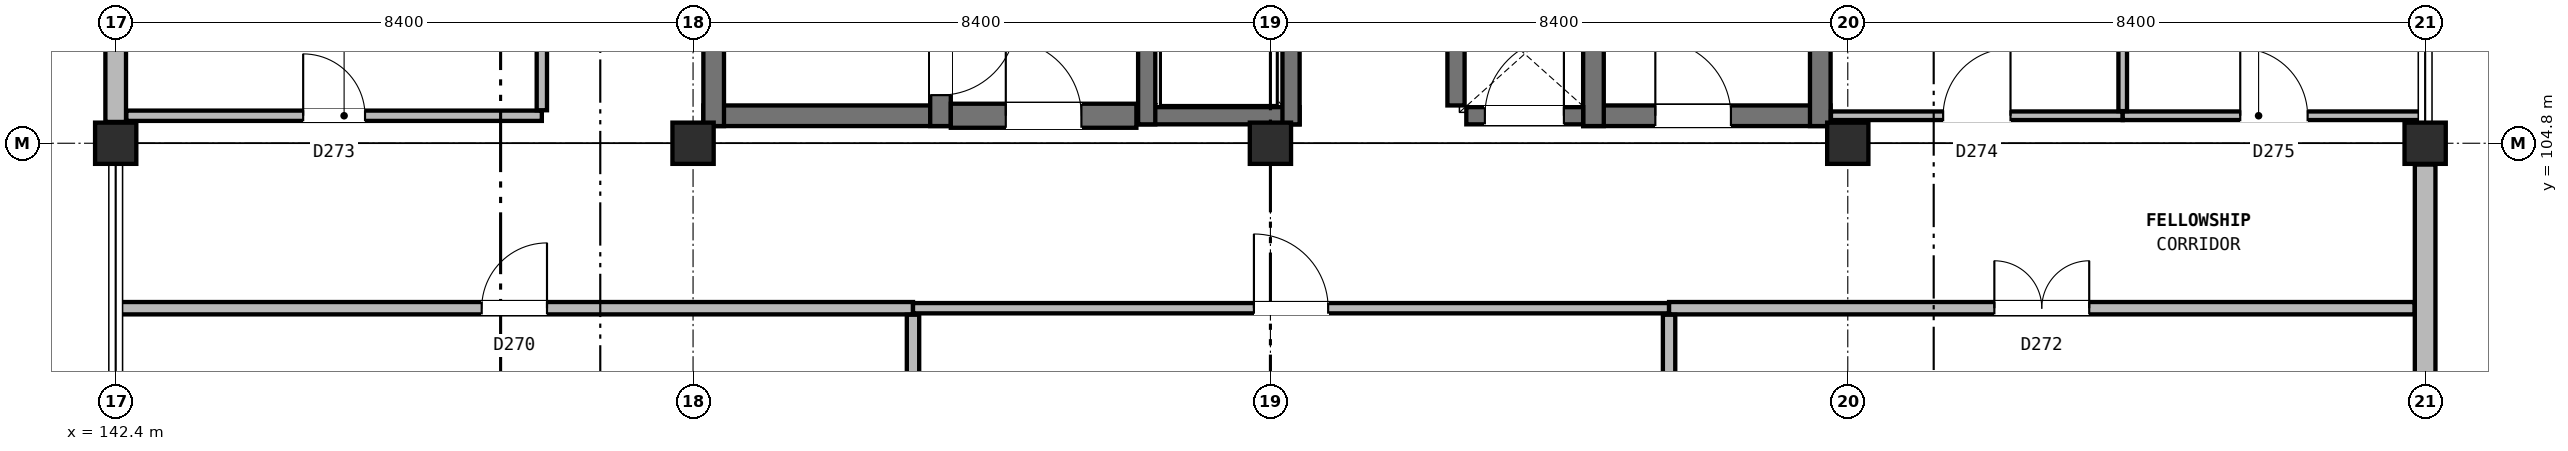
"""IFC4 building model, lengths in metres.
Left out: names, types, materials, properties, quantities, classifications, styles, units other than length and angle.
Written with IfcOpenShell. Run it as: python <this file> out.ifc"""

import sys

from ifc_helpers import new_model, si_unit, direction, frame, frame_2d, origin, origin_2d, place, context, subcontext, project, spatial, rectangle, extrude, element, fill, save


model = new_model("IFC4")
c1 = context("Model", 3, precision=1e-05, world=origin(), true_north=direction((0.0, 1.0)))
c2 = subcontext(c1, "Body", "Model", "MODEL_VIEW")
j1 = project(units=[si_unit("LENGTHUNIT", "METRE"), si_unit("PLANEANGLEUNIT", "RADIAN")], contexts=[c1])
p1 = place(None, origin())
s1 = spatial("IfcSite", under=j1, at=p1, CompositionType="ELEMENT")
p2 = place(p1, origin())
s2 = spatial("IfcBuilding", under=s1, at=p2, CompositionType="ELEMENT")
p3 = place(p2, frame((0.0, 0.0, 56.0)))
s3 = spatial("IfcBuildingStorey", under=s2, at=p3, CompositionType="ELEMENT", Elevation=56.0)
for number, where, z_axis, x_axis in (
    (1, (142.4, 104.8, 0.0), (0.0, 0.0, 1.0), (1.0, 0.0, 0.0)),
    (2, (150.8, 104.8, 0.0), (0.0, 0.0, 1.0), (1.0, 0.0, 0.0)),
    (3, (159.2, 104.8, 0.0), (0.0, 0.0, 1.0), (1.0, 0.0, 0.0)),
    (4, (167.6, 104.8, 0.0), (0.0, 0.0, 1.0), (1.0, 0.0, 0.0)),
    (5, (176.0, 104.8, 0.0), (0.0, 0.0, 1.0), (1.0, 0.0, 0.0)),
):
    element("IfcColumn", number, at=place(p3, frame(where, z_axis=z_axis, x_axis=x_axis)), inside=s3, PredefinedType="COLUMN", context=c2, shape_type="SweptSolid", body=[
        extrude(rectangle(XDim=0.6, YDim=0.6, at=origin_2d()), origin(), (0.0, 0.0, 1.0), 3.8),
    ])
p4 = place(p3, frame((176.0, 96.31, 0.0), z_axis=(0.0, 0.0, 1.0), x_axis=(0.0, 1.0, 0.0)))
e6 = element("IfcWall", 6, at=p4, inside=s3, PredefinedType="SOLIDWALL", context=c2, shape_type="SweptSolid", body=[
    extrude(rectangle(XDim=8.18, YDim=0.3, at=frame_2d((4.09, 0.0))), origin(), (0.0, 0.0, 1.0), 3.05),
])
p5 = place(p4, frame((1.745, 0.0, 0.9)))
e7 = element("IfcOpeningElement", 7, at=p5, cuts=e6, PredefinedType="OPENING", context=c2, shape_type="SweptSolid", body=[
    extrude(rectangle(XDim=2.6, YDim=2.0, at=frame_2d((1.3, 1.0))), frame((0.0, 0.16, 0.0), z_axis=(0.0, -1.0, 0.0), x_axis=(1.0, 0.0, 0.0)), (0.0, 0.0, 1.0), 0.32),
])
p6 = place(p3, frame((142.4, 113.29, 0.0), z_axis=(0.0, 0.0, 1.0), x_axis=(0.0, -1.0, 0.0)))
e8 = element("IfcWall", 8, at=p6, inside=s3, PredefinedType="SOLIDWALL", context=c2, shape_type="SweptSolid", body=[
    extrude(rectangle(XDim=8.18, YDim=0.3, at=frame_2d((4.09, 0.0))), origin(), (0.0, 0.0, 1.0), 3.05),
])
p7 = place(p6, frame((2.745, 0.0, 0.9)))
e9 = element("IfcOpeningElement", 9, at=p7, cuts=e8, PredefinedType="OPENING", context=c2, shape_type="SweptSolid", body=[
    extrude(rectangle(XDim=2.6, YDim=2.0, at=frame_2d((1.3, 1.0))), frame((0.0, 0.16, 0.0), z_axis=(0.0, -1.0, 0.0), x_axis=(1.0, 0.0, 0.0)), (0.0, 0.0, 1.0), 0.32),
])
p8 = place(p3, frame((150.95, 105.2, 0.0), z_axis=(0.0, 0.0, 1.0), x_axis=(1.0, 0.0, 0.0)))
e10 = element("IfcWall", 10, at=p8, inside=s3, PredefinedType="SHEAR", context=c2, shape_type="SweptSolid", body=[
    extrude(rectangle(XDim=3.6, YDim=0.3, at=frame_2d((1.8, 0.0))), origin(), (0.0, 0.0, 1.0), 3.8),
])
p9 = place(p3, frame((151.1, 105.05, 0.0), z_axis=(0.0, 0.0, 1.0), x_axis=(0.0, 1.0, 0.0)))
e11 = element("IfcWall", 11, at=p9, inside=s3, PredefinedType="SHEAR", context=c2, shape_type="SweptSolid", body=[
    extrude(rectangle(XDim=8.3, YDim=0.3, at=frame_2d((4.15, 0.0))), origin(), (0.0, 0.0, 1.0), 3.8),
])
p10 = place(p3, frame((154.4, 105.05, 0.0), z_axis=(0.0, 0.0, 1.0), x_axis=(0.0, 1.0, 0.0)))
e12 = element("IfcWall", 12, at=p10, inside=s3, PredefinedType="SHEAR", context=c2, shape_type="SweptSolid", body=[
    extrude(rectangle(XDim=8.3, YDim=0.3, at=frame_2d((4.15, 0.0))), origin(), (0.0, 0.0, 1.0), 3.8),
])
p11 = place(p10, frame((0.45, 0.0, 0.0)))
e13 = element("IfcOpeningElement", 13, at=p11, cuts=e12, PredefinedType="OPENING", context=c2, shape_type="SweptSolid", body=[
    extrude(rectangle(XDim=1.1, YDim=2.2, at=frame_2d((0.55, 1.1))), frame((0.0, 0.16, 0.0), z_axis=(0.0, -1.0, 0.0), x_axis=(1.0, 0.0, 0.0)), (0.0, 0.0, 1.0), 0.32),
])
p12 = place(p3, frame((163.75, 105.2, 0.0), z_axis=(0.0, 0.0, 1.0), x_axis=(1.0, 0.0, 0.0)))
e14 = element("IfcWall", 14, at=p12, inside=s3, PredefinedType="SHEAR", context=c2, shape_type="SweptSolid", body=[
    extrude(rectangle(XDim=3.6, YDim=0.3, at=frame_2d((1.8, 0.0))), origin(), (0.0, 0.0, 1.0), 3.8),
])
p13 = place(p12, frame((1.05, 0.0, 0.0)))
e15 = element("IfcOpeningElement", 15, at=p13, cuts=e14, PredefinedType="OPENING", context=c2, shape_type="SweptSolid", body=[
    extrude(rectangle(XDim=1.1, YDim=2.2, at=frame_2d((0.55, 1.1))), frame((0.0, 0.16, 0.0), z_axis=(0.0, -1.0, 0.0), x_axis=(1.0, 0.0, 0.0)), (0.0, 0.0, 1.0), 0.32),
])
for number, where, z_axis, x_axis in (
    (16, (163.9, 105.05, 0.0), (0.0, 0.0, 1.0), (0.0, 1.0, 0.0)),
    (17, (167.2, 105.05, 0.0), (0.0, 0.0, 1.0), (0.0, 1.0, 0.0)),
):
    element("IfcWall", number, at=place(p3, frame(where, z_axis=z_axis, x_axis=x_axis)), inside=s3, PredefinedType="SHEAR", context=c2, shape_type="SweptSolid", body=[
        extrude(rectangle(XDim=8.3, YDim=0.3, at=frame_2d((4.15, 0.0))), origin(), (0.0, 0.0, 1.0), 3.8),
    ])
p14 = place(p3, frame((157.275, 105.2, 0.0), z_axis=(0.0, 0.0, 1.0), x_axis=(1.0, 0.0, 0.0)))
e18 = element("IfcWall", 18, at=p14, inside=s3, PredefinedType="SOLIDWALL", context=c2, shape_type="SweptSolid", body=[
    extrude(rectangle(XDim=2.35, YDim=0.25, at=frame_2d((1.175, 0.0))), origin(), (0.0, 0.0, 1.0), 3.48),
])
for number, where, z_axis, x_axis in (
    (19, (157.4, 105.075, 0.0), (0.0, 0.0, 1.0), (0.0, 1.0, 0.0)),
    (20, (159.5, 105.075, 0.0), (0.0, 0.0, 1.0), (0.0, 1.0, 0.0)),
):
    element("IfcWall", number, at=place(p3, frame(where, z_axis=z_axis, x_axis=x_axis)), inside=s3, PredefinedType="SOLIDWALL", context=c2, shape_type="SweptSolid", body=[
        extrude(rectangle(XDim=2.65, YDim=0.25, at=frame_2d((1.325, 0.0))), origin(), (0.0, 0.0, 1.0), 3.48),
    ])
p15 = place(p3, frame((154.55, 105.2, 0.0), z_axis=(0.0, 0.0, 1.0), x_axis=(1.0, 0.0, 0.0)))
e21 = element("IfcWall", 21, at=p15, inside=s3, PredefinedType="SHEAR", context=c2, shape_type="SweptSolid", body=[
    extrude(rectangle(XDim=2.7, YDim=0.35, at=frame_2d((1.35, 0.0))), origin(), (0.0, 0.0, 1.0), 3.48),
])
p16 = place(p15, frame((0.8, 0.0, 0.0)))
e22 = element("IfcOpeningElement", 22, at=p16, cuts=e21, PredefinedType="OPENING", context=c2, shape_type="SweptSolid", body=[
    extrude(rectangle(XDim=1.1, YDim=2.2, at=frame_2d((0.55, 1.1))), frame((0.0, 0.185, 0.0), z_axis=(0.0, -1.0, 0.0), x_axis=(1.0, 0.0, 0.0)), (0.0, 0.0, 1.0), 0.37),
])
p17 = place(p3, frame((161.9, 105.35, 0.0), z_axis=(0.0, 0.0, 1.0), x_axis=(0.0, 1.0, 0.0)))
e23 = element("IfcWall", 23, at=p17, inside=s3, PredefinedType="SOLIDWALL", context=c2, shape_type="SweptSolid", body=[
    extrude(rectangle(XDim=1.5, YDim=0.25, at=frame_2d((0.75, 0.0))), origin(), (0.0, 0.0, 1.0), 3.48),
])
p18 = place(p3, frame((162.05, 105.2, 0.0), z_axis=(0.0, 0.0, 1.0), x_axis=(1.0, 0.0, 0.0)))
e24 = element("IfcWall", 24, at=p18, inside=s3, PredefinedType="SOLIDWALL", context=c2, shape_type="SweptSolid", body=[
    extrude(rectangle(XDim=1.7, YDim=0.25, at=frame_2d((0.85, 0.0))), origin(), (0.0, 0.0, 1.0), 3.48),
])
p19 = place(p18, frame((0.27, 0.0, 0.0)))
e25 = element("IfcOpeningElement", 25, at=p19, cuts=e24, PredefinedType="OPENING", context=c2, shape_type="SweptSolid", body=[
    extrude(rectangle(XDim=1.15, YDim=2.2, at=frame_2d((0.575, 1.1))), frame((0.0, 0.135, 0.0), z_axis=(0.0, -1.0, 0.0), x_axis=(1.0, 0.0, 0.0)), (0.0, 0.0, 1.0), 0.27),
])
p20 = place(p3, frame((142.4, 102.4, 0.0), z_axis=(0.0, 0.0, 1.0), x_axis=(1.0, 0.0, 0.0)))
e26 = element("IfcWall", 26, at=p20, inside=s3, PredefinedType="PARTITIONING", context=c2, shape_type="SweptSolid", body=[
    extrude(rectangle(XDim=11.6, YDim=0.18, at=frame_2d((5.8, 0.0))), origin(), (0.0, 0.0, 1.0), 3.465),
])
p21 = place(p20, frame((5.325, 0.0, 0.0)))
e27 = element("IfcOpeningElement", 27, at=p21, cuts=e26, PredefinedType="OPENING", context=c2, shape_type="SweptSolid", body=[
    extrude(rectangle(XDim=0.95, YDim=2.18, at=frame_2d((0.475, 1.09))), frame((0.0, 0.1, 0.0), z_axis=(0.0, -1.0, 0.0), x_axis=(1.0, 0.0, 0.0)), (0.0, 0.0, 1.0), 0.2),
])
p22 = place(p3, frame((154.0, 102.4, 0.0), z_axis=(0.0, 0.0, 1.0), x_axis=(1.0, 0.0, 0.0)))
e28 = element("IfcWall", 28, at=p22, inside=s3, PredefinedType="PARTITIONING", context=c2, shape_type="SweptSolid", body=[
    extrude(rectangle(XDim=11.0, YDim=0.15, at=frame_2d((5.5, 0.0))), origin(), (0.0, 0.0, 1.0), 3.465),
])
p23 = place(p22, frame((4.96, 0.0, 0.0)))
e29 = element("IfcOpeningElement", 29, at=p23, cuts=e28, PredefinedType="OPENING", context=c2, shape_type="SweptSolid", body=[
    extrude(rectangle(XDim=1.08, YDim=2.22, at=frame_2d((0.54, 1.11))), frame((0.0, 0.085, 0.0), z_axis=(0.0, -1.0, 0.0), x_axis=(1.0, 0.0, 0.0)), (0.0, 0.0, 1.0), 0.17),
])
p24 = place(p3, frame((165.0, 102.4, 0.0), z_axis=(0.0, 0.0, 1.0), x_axis=(1.0, 0.0, 0.0)))
e30 = element("IfcWall", 30, at=p24, inside=s3, PredefinedType="PARTITIONING", context=c2, shape_type="SweptSolid", body=[
    extrude(rectangle(XDim=10.845, YDim=0.18, at=frame_2d((5.422, 0.0))), origin(), (0.0, 0.0, 1.0), 3.465),
])
p25 = place(p24, frame((4.732, 0.0, 0.0)))
e31 = element("IfcOpeningElement", 31, at=p25, cuts=e30, PredefinedType="OPENING", context=c2, shape_type="SweptSolid", body=[
    extrude(rectangle(XDim=1.38, YDim=2.2, at=frame_2d((0.69, 1.1))), frame((0.0, 0.1, 0.0), z_axis=(0.0, -1.0, 0.0), x_axis=(1.0, 0.0, 0.0)), (0.0, 0.0, 1.0), 0.2),
])
p26 = place(p3, frame((142.555, 105.2, 0.0), z_axis=(0.0, 0.0, 1.0), x_axis=(1.0, 0.0, 0.0)))
e32 = element("IfcWall", 32, at=p26, inside=s3, PredefinedType="PARTITIONING", context=c2, shape_type="SweptSolid", body=[
    extrude(rectangle(XDim=6.045, YDim=0.15, at=frame_2d((3.022, 0.0))), origin(), (0.0, 0.0, 1.0), 3.045),
])
p27 = place(p26, frame((2.573, 0.0, 0.0)))
e33 = element("IfcOpeningElement", 33, at=p27, cuts=e32, PredefinedType="OPENING", context=c2, shape_type="SweptSolid", body=[
    extrude(rectangle(XDim=0.9, YDim=2.12, at=frame_2d((0.45, 1.06))), frame((0.0, 0.085, 0.0), z_axis=(0.0, -1.0, 0.0), x_axis=(1.0, 0.0, 0.0)), (0.0, 0.0, 1.0), 0.17),
])
p28 = place(p3, frame((167.355, 105.2, 0.0), z_axis=(0.0, 0.0, 1.0), x_axis=(1.0, 0.0, 0.0)))
e34 = element("IfcWall", 34, at=p28, inside=s3, PredefinedType="PARTITIONING", context=c2, shape_type="SweptSolid", body=[
    extrude(rectangle(XDim=4.245, YDim=0.125, at=frame_2d((2.123, 0.0))), origin(), (0.0, 0.0, 1.0), 3.045),
])
p29 = place(p28, frame((1.633, 0.0, 0.0)))
e35 = element("IfcOpeningElement", 35, at=p29, cuts=e34, PredefinedType="OPENING", context=c2, shape_type="SweptSolid", body=[
    extrude(rectangle(XDim=0.98, YDim=2.1, at=frame_2d((0.49, 1.05))), frame((0.0, 0.073, 0.0), z_axis=(0.0, -1.0, 0.0), x_axis=(1.0, 0.0, 0.0)), (0.0, 0.0, 1.0), 0.145),
])
p30 = place(p3, frame((171.6, 105.2, 0.0), z_axis=(0.0, 0.0, 1.0), x_axis=(1.0, 0.0, 0.0)))
e36 = element("IfcWall", 36, at=p30, inside=s3, PredefinedType="PARTITIONING", context=c2, shape_type="SweptSolid", body=[
    extrude(rectangle(XDim=4.4, YDim=0.125, at=frame_2d((2.2, 0.0))), origin(), (0.0, 0.0, 1.0), 3.045),
])
p31 = place(p30, frame((1.71, 0.0, 0.0)))
e37 = element("IfcOpeningElement", 37, at=p31, cuts=e36, PredefinedType="OPENING", context=c2, shape_type="SweptSolid", body=[
    extrude(rectangle(XDim=0.98, YDim=2.1, at=frame_2d((0.49, 1.05))), frame((0.0, 0.073, 0.0), z_axis=(0.0, -1.0, 0.0), x_axis=(1.0, 0.0, 0.0)), (0.0, 0.0, 1.0), 0.145),
])
p32 = place(p3, frame((148.6, 105.28, 0.0), z_axis=(0.0, 0.0, 1.0), x_axis=(0.0, 1.0, 0.0)))
e38 = element("IfcWall", 38, at=p32, inside=s3, PredefinedType="PARTITIONING", context=c2, shape_type="SweptSolid", body=[
    extrude(rectangle(XDim=14.12, YDim=0.15, at=frame_2d((7.06, 0.0))), origin(), (0.0, 0.0, 1.0), 3.465),
])
p33 = place(p3, frame((154.0, 87.355, 0.0), z_axis=(0.0, 0.0, 1.0), x_axis=(0.0, 1.0, 0.0)))
e39 = element("IfcWall", 39, at=p33, inside=s3, PredefinedType="PARTITIONING", context=c2, shape_type="SweptSolid", body=[
    extrude(rectangle(XDim=14.95, YDim=0.18, at=frame_2d((7.475, 0.0))), origin(), (0.0, 0.0, 1.0), 3.465),
])
p34 = place(p3, frame((165.0, 87.2, 0.0), z_axis=(0.0, 0.0, 1.0), x_axis=(0.0, 1.0, 0.0)))
e40 = element("IfcWall", 40, at=p34, inside=s3, PredefinedType="PARTITIONING", context=c2, shape_type="SweptSolid", body=[
    extrude(rectangle(XDim=15.105, YDim=0.18, at=frame_2d((7.552, 0.0))), origin(), (0.0, 0.0, 1.0), 3.465),
])
p35 = place(p3, frame((171.6, 105.268, 0.0), z_axis=(0.0, 0.0, 1.0), x_axis=(0.0, 1.0, 0.0)))
e41 = element("IfcWall", 41, at=p35, inside=s3, PredefinedType="PARTITIONING", context=c2, shape_type="SweptSolid", body=[
    extrude(rectangle(XDim=16.978, YDim=0.125, at=frame_2d((8.489, 0.0))), origin(), (0.0, 0.0, 1.0), 3.465),
])
p36 = place(p11, frame((1.1, 0.0, 0.0), z_axis=(0.0, 0.0, 1.0), x_axis=(-1.0, 0.0, 0.0)))
e42 = element("IfcDoor", 42, at=p36, inside=s3, OperationType="SINGLE_SWING_RIGHT", PredefinedType="DOOR", context=c2, shape_type="SweptSolid", body=[
    extrude(rectangle(XDim=1.1, YDim=2.2, at=frame_2d((0.55, 1.1))), frame((0.0, 0.025, 0.0), z_axis=(0.0, -1.0, 0.0), x_axis=(1.0, 0.0, 0.0)), (0.0, 0.0, 1.0), 0.05),
])
fill(e13, e42)
p37 = place(p13, origin())
e43 = element("IfcDoor", 43, at=p37, inside=s3, OperationType="SINGLE_SWING_LEFT", PredefinedType="DOOR", context=c2, shape_type="SweptSolid", body=[
    extrude(rectangle(XDim=1.1, YDim=2.2, at=frame_2d((0.55, 1.1))), frame((0.0, 0.025, 0.0), z_axis=(0.0, -1.0, 0.0), x_axis=(1.0, 0.0, 0.0)), (0.0, 0.0, 1.0), 0.05),
])
fill(e15, e43)
p38 = place(p16, origin())
e44 = element("IfcDoor", 44, at=p38, inside=s3, OperationType="SINGLE_SWING_LEFT", PredefinedType="DOOR", context=c2, shape_type="SweptSolid", body=[
    extrude(rectangle(XDim=1.1, YDim=2.2, at=frame_2d((0.55, 1.1))), frame((0.0, 0.025, 0.0), z_axis=(0.0, -1.0, 0.0), x_axis=(1.0, 0.0, 0.0)), (0.0, 0.0, 1.0), 0.05),
])
fill(e22, e44)
p39 = place(p19, origin())
e45 = element("IfcDoor", 45, at=p39, inside=s3, OperationType="SINGLE_SWING_RIGHT", PredefinedType="DOOR", context=c2, shape_type="SweptSolid", body=[
    extrude(rectangle(XDim=1.15, YDim=2.2, at=frame_2d((0.575, 1.1))), frame((0.0, 0.025, 0.0), z_axis=(0.0, -1.0, 0.0), x_axis=(1.0, 0.0, 0.0)), (0.0, 0.0, 1.0), 0.05),
])
fill(e25, e45)
p40 = place(p21, origin())
e46 = element("IfcDoor", 46, at=p40, inside=s3, OperationType="SINGLE_SWING_RIGHT", PredefinedType="DOOR", context=c2, shape_type="SweptSolid", body=[
    extrude(rectangle(XDim=0.95, YDim=2.18, at=frame_2d((0.475, 1.09))), frame((0.0, 0.025, 0.0), z_axis=(0.0, -1.0, 0.0), x_axis=(1.0, 0.0, 0.0)), (0.0, 0.0, 1.0), 0.05),
])
fill(e27, e46)
p41 = place(p23, origin())
e47 = element("IfcDoor", 47, at=p41, inside=s3, OperationType="SINGLE_SWING_LEFT", PredefinedType="DOOR", context=c2, shape_type="SweptSolid", body=[
    extrude(rectangle(XDim=1.08, YDim=2.22, at=frame_2d((0.54, 1.11))), frame((0.0, 0.025, 0.0), z_axis=(0.0, -1.0, 0.0), x_axis=(1.0, 0.0, 0.0)), (0.0, 0.0, 1.0), 0.05),
])
fill(e29, e47)
p42 = place(p25, origin())
e48 = element("IfcDoor", 48, at=p42, inside=s3, OperationType="DOUBLE_DOOR_SINGLE_SWING", PredefinedType="DOOR", context=c2, shape_type="SweptSolid", body=[
    extrude(rectangle(XDim=1.38, YDim=2.2, at=frame_2d((0.69, 1.1))), frame((0.0, 0.025, 0.0), z_axis=(0.0, -1.0, 0.0), x_axis=(1.0, 0.0, 0.0)), (0.0, 0.0, 1.0), 0.05),
])
fill(e31, e48)
p43 = place(p27, origin())
e49 = element("IfcDoor", 49, at=p43, inside=s3, OperationType="SINGLE_SWING_LEFT", PredefinedType="DOOR", context=c2, shape_type="SweptSolid", body=[
    extrude(rectangle(XDim=0.9, YDim=2.12, at=frame_2d((0.45, 1.06))), frame((0.0, 0.025, 0.0), z_axis=(0.0, -1.0, 0.0), x_axis=(1.0, 0.0, 0.0)), (0.0, 0.0, 1.0), 0.05),
])
fill(e33, e49)
p44 = place(p29, origin())
e50 = element("IfcDoor", 50, at=p44, inside=s3, OperationType="SINGLE_SWING_RIGHT", PredefinedType="DOOR", context=c2, shape_type="SweptSolid", body=[
    extrude(rectangle(XDim=0.98, YDim=2.1, at=frame_2d((0.49, 1.05))), frame((0.0, 0.025, 0.0), z_axis=(0.0, -1.0, 0.0), x_axis=(1.0, 0.0, 0.0)), (0.0, 0.0, 1.0), 0.05),
])
fill(e35, e50)
p45 = place(p31, origin())
e51 = element("IfcDoor", 51, at=p45, inside=s3, OperationType="SINGLE_SWING_LEFT", PredefinedType="DOOR", context=c2, shape_type="SweptSolid", body=[
    extrude(rectangle(XDim=0.98, YDim=2.1, at=frame_2d((0.49, 1.05))), frame((0.0, 0.025, 0.0), z_axis=(0.0, -1.0, 0.0), x_axis=(1.0, 0.0, 0.0)), (0.0, 0.0, 1.0), 0.05),
])
fill(e37, e51)
save(model, sys.argv[1])
